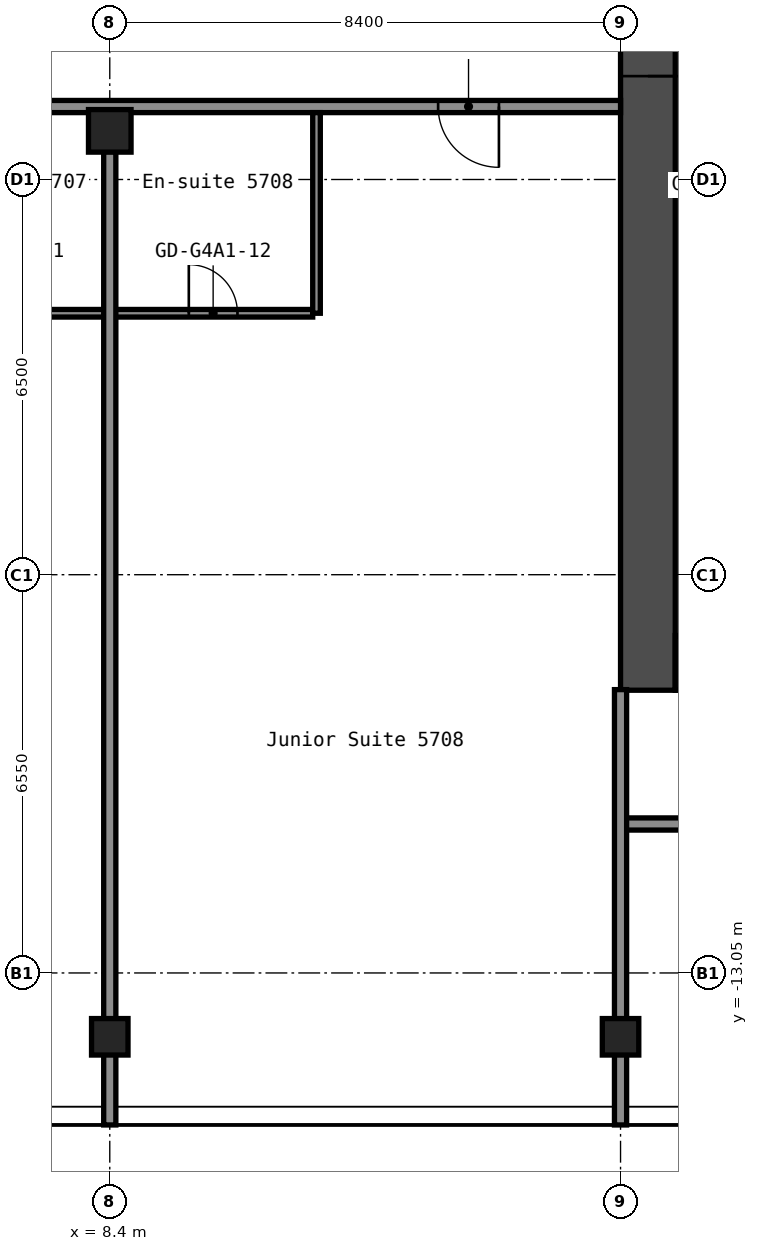
"""IFC4 building model, lengths in metres.
Left out: names, types, materials, properties, quantities, classifications, styles, units other than length and angle.
Written with IfcOpenShell. Run it as: python <this file> out.ifc"""

import sys

from ifc_helpers import new_model, si_unit, direction, frame, frame_2d, origin, origin_2d, place, context, subcontext, project, spatial, rectangle, hollow_rectangle, extrude, element, fill, save


model = new_model("IFC4")
c1 = context("Model", 3, precision=1e-05, world=origin(), true_north=direction((0.0, 1.0)))
c2 = subcontext(c1, "Body", "Model", "MODEL_VIEW")
j1 = project(units=[si_unit("LENGTHUNIT", "METRE"), si_unit("PLANEANGLEUNIT", "RADIAN")], contexts=[c1])
p1 = place(None, origin())
s1 = spatial("IfcSite", under=j1, at=p1, CompositionType="ELEMENT")
p2 = place(p1, origin())
s2 = spatial("IfcBuilding", under=s1, at=p2, CompositionType="ELEMENT")
p3 = place(p2, frame((0.0, 0.0, 202.6)))
s3 = spatial("IfcBuildingStorey", under=s2, at=p3, CompositionType="ELEMENT", Elevation=202.6)
p4 = place(p3, frame((8.4, -14.1, 0.0), z_axis=(0.0, 0.0, 1.0), x_axis=(1.0, 0.0, 0.0)))
e1 = element("IfcColumn", 1, at=p4, inside=s3, PredefinedType="COLUMN", context=c2, shape_type="SweptSolid", body=[
    extrude(hollow_rectangle(XDim=0.6, YDim=0.6, WallThickness=0.025, InnerFilletRadius=0.038, OuterFilletRadius=0.062, at=origin_2d()), origin(), (0.0, 0.0, 1.0), 2.75),
])
p5 = place(p3, frame((8.4, 0.8, 0.0), z_axis=(0.0, 0.0, 1.0), x_axis=(1.0, 0.0, 0.0)))
e2 = element("IfcColumn", 2, at=p5, inside=s3, PredefinedType="COLUMN", context=c2, shape_type="SweptSolid", body=[
    extrude(hollow_rectangle(XDim=0.7, YDim=0.7, WallThickness=0.028, at=origin_2d()), origin(), (0.0, 0.0, 1.0), 2.75),
])
p6 = place(p3, frame((16.8, -14.1, 0.0), z_axis=(0.0, 0.0, 1.0), x_axis=(1.0, 0.0, 0.0)))
e3 = element("IfcColumn", 3, at=p6, inside=s3, PredefinedType="COLUMN", context=c2, shape_type="SweptSolid", body=[
    extrude(hollow_rectangle(XDim=0.6, YDim=0.6, WallThickness=0.025, InnerFilletRadius=0.038, OuterFilletRadius=0.062, at=origin_2d()), origin(), (0.0, 0.0, 1.0), 2.75),
])
p7 = place(p3, frame((17.25, -8.4, 0.0), z_axis=(0.0, 0.0, 1.0), x_axis=(0.0, 1.0, 0.0)))
e4 = element("IfcWall", 4, at=p7, inside=s3, PredefinedType="SHEAR", context=c2, shape_type="SweptSolid", body=[
    extrude(rectangle(XDim=16.8, YDim=0.9, at=frame_2d((8.4, 0.0))), origin(), (0.0, 0.0, 1.0), 2.75),
])
p8 = place(p7, frame((10.1, 0.0, 0.0)))
e5 = element("IfcOpeningElement", 5, at=p8, cuts=e4, PredefinedType="OPENING", context=c2, shape_type="SweptSolid", body=[
    extrude(rectangle(XDim=1.6, YDim=2.1, at=frame_2d((0.8, 1.05))), frame((0.0, 0.46, 0.0), z_axis=(0.0, -1.0, 0.0), x_axis=(1.0, 0.0, 0.0)), (0.0, 0.0, 1.0), 0.92),
])
p9 = place(p3, frame((17.7, -7.95, 0.0), z_axis=(0.0, 0.0, 1.0), x_axis=(1.0, 0.0, 0.0)))
e6 = element("IfcWall", 6, at=p9, inside=s3, PredefinedType="SHEAR", context=c2, shape_type="SweptSolid", body=[
    extrude(rectangle(XDim=15.0, YDim=0.9, at=frame_2d((7.5, 0.0))), origin(), (0.0, 0.0, 1.0), 2.75),
])
p10 = place(p9, frame((2.55, 0.0, 0.0)))
e7 = element("IfcOpeningElement", 7, at=p10, cuts=e6, PredefinedType="OPENING", context=c2, shape_type="SweptSolid", body=[
    extrude(rectangle(XDim=1.0, YDim=2.1, at=frame_2d((0.5, 1.05))), frame((0.0, 0.46, 0.0), z_axis=(0.0, -1.0, 0.0), x_axis=(1.0, 0.0, 0.0)), (0.0, 0.0, 1.0), 0.92),
])
p11 = place(p3, frame((16.8, -10.6, 0.0), z_axis=(0.0, 0.0, 1.0), x_axis=(1.0, 0.0, 0.0)))
e8 = element("IfcWall", 8, at=p11, inside=s3, PredefinedType="PARTITIONING", context=c2, shape_type="SweptSolid", body=[
    extrude(rectangle(XDim=21.3, YDim=0.2, at=frame_2d((10.65, 0.0))), origin(), (0.0, 0.0, 1.0), 2.75),
])
p12 = place(p11, frame((1.82, 0.0, 0.0)))
e9 = element("IfcOpeningElement", 9, at=p12, cuts=e8, PredefinedType="OPENING", context=c2, shape_type="SweptSolid", body=[
    extrude(rectangle(XDim=0.9, YDim=2.1, at=frame_2d((0.45, 1.05))), frame((0.0, 0.11, 0.0), z_axis=(0.0, -1.0, 0.0), x_axis=(1.0, 0.0, 0.0)), (0.0, 0.0, 1.0), 0.22),
])
p13 = place(p11, frame((6.02, 0.0, 0.0)))
e10 = element("IfcOpeningElement", 10, at=p13, cuts=e8, PredefinedType="OPENING", context=c2, shape_type="SweptSolid", body=[
    extrude(rectangle(XDim=0.9, YDim=2.1, at=frame_2d((0.45, 1.05))), frame((0.0, 0.11, 0.0), z_axis=(0.0, -1.0, 0.0), x_axis=(1.0, 0.0, 0.0)), (0.0, 0.0, 1.0), 0.22),
])
p14 = place(p11, frame((12.1, 0.0, 0.0)))
e11 = element("IfcOpeningElement", 11, at=p14, cuts=e8, PredefinedType="OPENING", context=c2, shape_type="SweptSolid", body=[
    extrude(rectangle(XDim=1.0, YDim=2.1, at=frame_2d((0.5, 1.05))), frame((0.0, 0.11, 0.0), z_axis=(0.0, -1.0, 0.0), x_axis=(1.0, 0.0, 0.0)), (0.0, 0.0, 1.0), 0.22),
])
p15 = place(p11, frame((18.45, 0.0, 0.0)))
e12 = element("IfcOpeningElement", 12, at=p15, cuts=e8, PredefinedType="OPENING", context=c2, shape_type="SweptSolid", body=[
    extrude(rectangle(XDim=0.9, YDim=2.1, at=frame_2d((0.45, 1.05))), frame((0.0, 0.11, 0.0), z_axis=(0.0, -1.0, 0.0), x_axis=(1.0, 0.0, 0.0)), (0.0, 0.0, 1.0), 0.22),
])
p16 = place(p3, frame((5.062, -2.2, 0.0), z_axis=(0.0, 0.0, 1.0), x_axis=(1.0, 0.0, 0.0)))
e13 = element("IfcWall", 13, at=p16, inside=s3, PredefinedType="PARTITIONING", context=c2, shape_type="SweptSolid", body=[
    extrude(rectangle(XDim=6.675, YDim=0.125, at=frame_2d((3.337, 0.0))), origin(), (0.0, 0.0, 1.0), 2.75),
])
p17 = place(p16, frame((1.238, 0.0, 0.0)))
e14 = element("IfcOpeningElement", 14, at=p17, cuts=e13, PredefinedType="OPENING", context=c2, shape_type="SweptSolid", body=[
    extrude(rectangle(XDim=0.8, YDim=2.1, at=frame_2d((0.4, 1.05))), frame((0.0, 0.073, 0.0), z_axis=(0.0, -1.0, 0.0), x_axis=(1.0, 0.0, 0.0)), (0.0, 0.0, 1.0), 0.145),
])
p18 = place(p16, frame((4.637, 0.0, 0.0)))
e15 = element("IfcOpeningElement", 15, at=p18, cuts=e13, PredefinedType="OPENING", context=c2, shape_type="SweptSolid", body=[
    extrude(rectangle(XDim=0.8, YDim=2.1, at=frame_2d((0.4, 1.05))), frame((0.0, 0.073, 0.0), z_axis=(0.0, -1.0, 0.0), x_axis=(1.0, 0.0, 0.0)), (0.0, 0.0, 1.0), 0.145),
])
p19 = place(p3, frame((-16.8, 1.2, 0.0), z_axis=(0.0, 0.0, 1.0), x_axis=(1.0, 0.0, 0.0)))
e16 = element("IfcWall", 16, at=p19, inside=s3, PredefinedType="PARTITIONING", context=c2, shape_type="SweptSolid", body=[
    extrude(rectangle(XDim=33.6, YDim=0.2, at=frame_2d((16.8, 0.0))), origin(), (0.0, 0.0, 1.0), 2.75),
])
p20 = place(p19, frame((2.0, 0.0, 0.0)))
e17 = element("IfcOpeningElement", 17, at=p20, cuts=e16, PredefinedType="OPENING", context=c2, shape_type="SweptSolid", body=[
    extrude(rectangle(XDim=1.0, YDim=2.1, at=frame_2d((0.5, 1.05))), frame((0.0, 0.11, 0.0), z_axis=(0.0, -1.0, 0.0), x_axis=(1.0, 0.0, 0.0)), (0.0, 0.0, 1.0), 0.22),
])
p21 = place(p19, frame((9.8, 0.0, 0.0)))
e18 = element("IfcOpeningElement", 18, at=p21, cuts=e16, PredefinedType="OPENING", context=c2, shape_type="SweptSolid", body=[
    extrude(rectangle(XDim=0.9, YDim=2.1, at=frame_2d((0.45, 1.05))), frame((0.0, 0.11, 0.0), z_axis=(0.0, -1.0, 0.0), x_axis=(1.0, 0.0, 0.0)), (0.0, 0.0, 1.0), 0.22),
])
p22 = place(p19, frame((14.0, 0.0, 0.0)))
e19 = element("IfcOpeningElement", 19, at=p22, cuts=e16, PredefinedType="OPENING", context=c2, shape_type="SweptSolid", body=[
    extrude(rectangle(XDim=0.9, YDim=2.1, at=frame_2d((0.45, 1.05))), frame((0.0, 0.11, 0.0), z_axis=(0.0, -1.0, 0.0), x_axis=(1.0, 0.0, 0.0)), (0.0, 0.0, 1.0), 0.22),
])
p23 = place(p19, frame((18.8, 0.0, 0.0)))
e20 = element("IfcOpeningElement", 20, at=p23, cuts=e16, PredefinedType="OPENING", context=c2, shape_type="SweptSolid", body=[
    extrude(rectangle(XDim=1.0, YDim=2.1, at=frame_2d((0.5, 1.05))), frame((0.0, 0.11, 0.0), z_axis=(0.0, -1.0, 0.0), x_axis=(1.0, 0.0, 0.0)), (0.0, 0.0, 1.0), 0.22),
])
p24 = place(p19, frame((30.6, 0.0, 0.0)))
e21 = element("IfcOpeningElement", 21, at=p24, cuts=e16, PredefinedType="OPENING", context=c2, shape_type="SweptSolid", body=[
    extrude(rectangle(XDim=1.0, YDim=2.1, at=frame_2d((0.5, 1.05))), frame((0.0, 0.11, 0.0), z_axis=(0.0, -1.0, 0.0), x_axis=(1.0, 0.0, 0.0)), (0.0, 0.0, 1.0), 0.22),
])
p25 = place(p3, frame((8.4, -15.55, 0.0), z_axis=(0.0, 0.0, 1.0), x_axis=(0.0, 1.0, 0.0)))
e22 = element("IfcWall", 22, at=p25, inside=s3, PredefinedType="PARTITIONING", context=c2, shape_type="SweptSolid", body=[
    extrude(rectangle(XDim=16.01, YDim=0.2, at=frame_2d((8.005, 0.0))), origin(), (0.0, 0.0, 1.0), 2.75),
])
p26 = place(p3, frame((11.8, -2.2, 0.0), z_axis=(0.0, 0.0, 1.0), x_axis=(0.0, 1.0, 0.0)))
e23 = element("IfcWall", 23, at=p26, inside=s3, PredefinedType="PARTITIONING", context=c2, shape_type="SweptSolid", body=[
    extrude(rectangle(XDim=3.3, YDim=0.125, at=frame_2d((1.65, 0.0))), origin(), (0.0, 0.0, 1.0), 2.75),
])
p27 = place(p3, frame((16.8, -15.55, 0.0), z_axis=(0.0, 0.0, 1.0), x_axis=(0.0, 1.0, 0.0)))
e24 = element("IfcWall", 24, at=p27, inside=s3, PredefinedType="PARTITIONING", context=c2, shape_type="SweptSolid", body=[
    extrude(rectangle(XDim=7.16, YDim=0.2, at=frame_2d((3.58, 0.0))), origin(), (0.0, 0.0, 1.0), 2.75),
])
p28 = place(p8, origin())
e25 = element("IfcDoor", 25, at=p28, inside=s3, OperationType="DOUBLE_DOOR_SINGLE_SWING", PredefinedType="DOOR", context=c2, shape_type="SweptSolid", body=[
    extrude(rectangle(XDim=1.6, YDim=2.1, at=frame_2d((0.8, 1.05))), frame((0.0, 0.025, 0.0), z_axis=(0.0, -1.0, 0.0), x_axis=(1.0, 0.0, 0.0)), (0.0, 0.0, 1.0), 0.05),
])
fill(e5, e25)
p29 = place(p18, origin())
e26 = element("IfcDoor", 26, at=p29, inside=s3, OperationType="SINGLE_SWING_RIGHT", PredefinedType="DOOR", context=c2, shape_type="SweptSolid", body=[
    extrude(rectangle(XDim=0.8, YDim=2.1, at=frame_2d((0.4, 1.05))), frame((0.0, 0.025, 0.0), z_axis=(0.0, -1.0, 0.0), x_axis=(1.0, 0.0, 0.0)), (0.0, 0.0, 1.0), 0.05),
])
fill(e15, e26)
p30 = place(p24, origin())
e27 = element("IfcDoor", 27, at=p30, inside=s3, OperationType="SINGLE_SWING_RIGHT", PredefinedType="DOOR", context=c2, shape_type="SweptSolid", body=[
    extrude(rectangle(XDim=1.0, YDim=2.1, at=frame_2d((0.5, 1.05))), frame((0.0, 0.025, 0.0), z_axis=(0.0, -1.0, 0.0), x_axis=(1.0, 0.0, 0.0)), (0.0, 0.0, 1.0), 0.05),
])
fill(e21, e27)
save(model, sys.argv[1])
